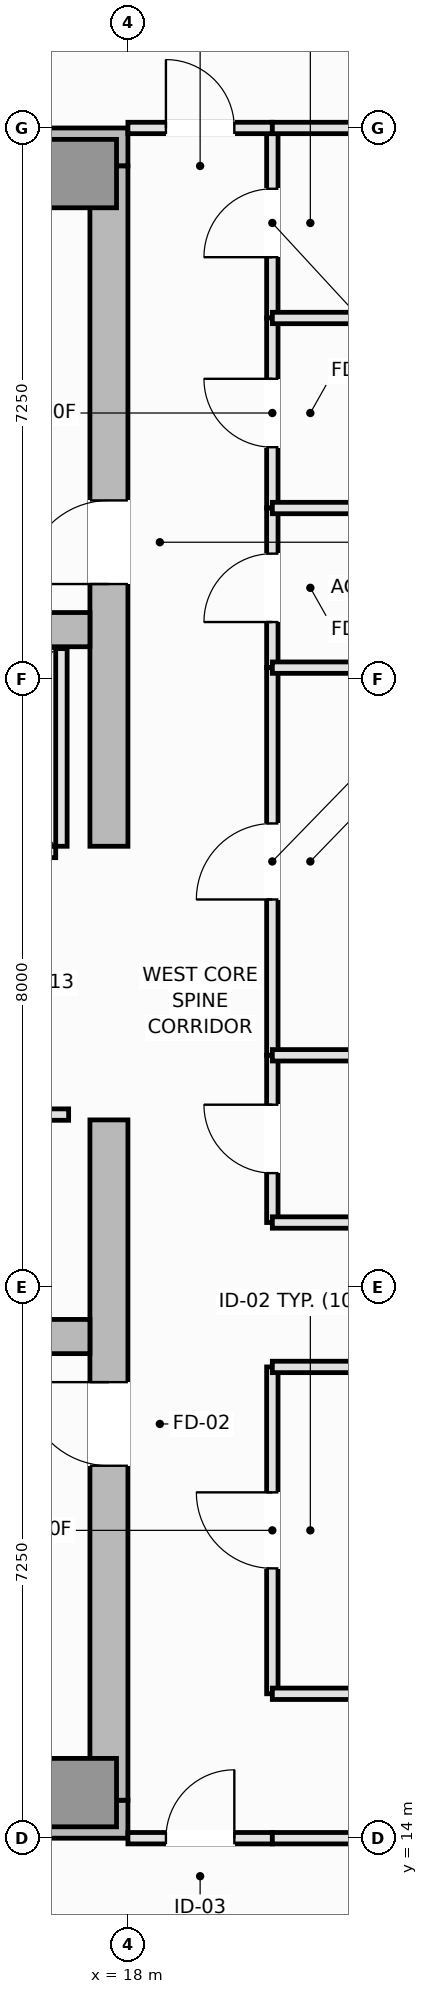
"""IFC4 building model, lengths in metres.
Left out: names, types, materials, properties, quantities, classifications, styles, units other than length and angle.
Written with IfcOpenShell. Run it as: python <this file> out.ifc"""

import sys

from ifc_helpers import new_model, si_unit, direction, frame, frame_2d, origin, origin_2d, place, context, subcontext, project, spatial, rectangle, extrude, element, fill, save


model = new_model("IFC4")
c1 = context("Model", 3, precision=1e-05, world=origin(), true_north=direction((0.0, 1.0)))
c2 = subcontext(c1, "Body", "Model", "MODEL_VIEW")
j1 = project(units=[si_unit("LENGTHUNIT", "METRE"), si_unit("PLANEANGLEUNIT", "RADIAN")], contexts=[c1])
p1 = place(None, origin())
s1 = spatial("IfcSite", under=j1, at=p1, CompositionType="ELEMENT")
p2 = place(p1, origin())
s2 = spatial("IfcBuilding", under=s1, at=p2, CompositionType="ELEMENT")
p3 = place(p2, frame((0.0, 0.0, 270.55)))
s3 = spatial("IfcBuildingStorey", under=s2, at=p3, CompositionType="ELEMENT", Elevation=270.55)
for number, where, z_axis, x_axis in (
    (1, (4.5, 14.25, 0.0), (0.0, 0.0, 1.0), (1.0, 0.0, 0.0)),
    (2, (4.5, 36.25, 0.0), (0.0, 0.0, 1.0), (1.0, 0.0, 0.0)),
):
    element("IfcWall", number, at=place(p3, frame(where, z_axis=z_axis, x_axis=x_axis)), inside=s3, PredefinedType="SHEAR", context=c2, shape_type="SweptSolid", body=[
        extrude(rectangle(XDim=13.5, YDim=0.5, at=frame_2d((6.75, 0.0))), origin(), (0.0, 0.0, 1.0), 3.55),
    ])
p4 = place(p3, frame((17.75, 14.5, 0.0), z_axis=(0.0, 0.0, 1.0), x_axis=(0.0, 1.0, 0.0)))
e3 = element("IfcWall", 3, at=p4, inside=s3, PredefinedType="SHEAR", context=c2, shape_type="SweptSolid", body=[
    extrude(rectangle(XDim=8.95, YDim=0.5, at=frame_2d((4.475, 0.0))), origin(), (0.0, 0.0, 1.0), 3.55),
])
p5 = place(p4, frame((4.4, 0.0, 0.0)))
e4 = element("IfcOpeningElement", 4, at=p5, cuts=e3, PredefinedType="OPENING", context=c2, shape_type="SweptSolid", body=[
    extrude(rectangle(XDim=1.1, YDim=2.15, at=frame_2d((0.55, 1.075))), frame((0.0, 0.26, 0.0), z_axis=(0.0, -1.0, 0.0), x_axis=(1.0, 0.0, 0.0)), (0.0, 0.0, 1.0), 0.52),
])
p6 = place(p3, frame((17.75, 27.05, 0.0), z_axis=(0.0, 0.0, 1.0), x_axis=(0.0, 1.0, 0.0)))
e5 = element("IfcWall", 5, at=p6, inside=s3, PredefinedType="SHEAR", context=c2, shape_type="SweptSolid", body=[
    extrude(rectangle(XDim=8.95, YDim=0.5, at=frame_2d((4.475, 0.0))), origin(), (0.0, 0.0, 1.0), 3.55),
])
p7 = place(p6, frame((3.45, 0.0, 0.0)))
e6 = element("IfcOpeningElement", 6, at=p7, cuts=e5, PredefinedType="OPENING", context=c2, shape_type="SweptSolid", body=[
    extrude(rectangle(XDim=1.1, YDim=2.15, at=frame_2d((0.55, 1.075))), frame((0.0, 0.26, 0.0), z_axis=(0.0, -1.0, 0.0), x_axis=(1.0, 0.0, 0.0)), (0.0, 0.0, 1.0), 0.52),
])
for number, where, z_axis, x_axis in (
    (7, (5.0, 20.6, 0.0), (0.0, 0.0, 1.0), (1.0, 0.0, 0.0)),
    (8, (5.0, 29.9, 0.0), (0.0, 0.0, 1.0), (1.0, 0.0, 0.0)),
):
    element("IfcWall", number, at=place(p3, frame(where, z_axis=z_axis, x_axis=x_axis)), inside=s3, PredefinedType="SHEAR", context=c2, shape_type="SweptSolid", body=[
        extrude(rectangle(XDim=12.5, YDim=0.45, at=frame_2d((6.25, 0.0))), origin(), (0.0, 0.0, 1.0), 3.55),
    ])
for number, where, z_axis, x_axis in (
    (9, (17.4, 14.6, 0.0), (0.0, 0.0, 1.0), (1.0, 0.0, 0.0)),
    (10, (17.4, 35.9, 0.0), (0.0, 0.0, 1.0), (1.0, 0.0, 0.0)),
):
    element("IfcColumn", number, at=place(p3, frame(where, z_axis=z_axis, x_axis=x_axis)), inside=s3, PredefinedType="PILASTER", context=c2, shape_type="SweptSolid", body=[
        extrude(rectangle(XDim=0.9, YDim=0.9, at=origin_2d()), origin(), (0.0, 0.0, 1.0), 3.55),
    ])
p8 = place(p3, frame((14.5, 26.975, 0.0), z_axis=(0.0, 0.0, 1.0), x_axis=(1.0, 0.0, 0.0)))
e11 = element("IfcWall", 11, at=p8, inside=s3, PredefinedType="PARTITIONING", context=c2, shape_type="SweptSolid", body=[
    extrude(rectangle(XDim=2.55, YDim=0.15, at=frame_2d((1.275, 0.0))), origin(), (0.0, 0.0, 1.0), 3.39),
])
p9 = place(p8, frame((0.625, 0.0, 0.0)))
e12 = element("IfcOpeningElement", 12, at=p9, cuts=e11, PredefinedType="OPENING", context=c2, shape_type="SweptSolid", body=[
    extrude(rectangle(XDim=1.3, YDim=2.2, at=frame_2d((0.65, 1.1))), frame((0.0, 0.085, 0.0), z_axis=(0.0, -1.0, 0.0), x_axis=(1.0, 0.0, 0.0)), (0.0, 0.0, 1.0), 0.17),
])
p10 = place(p3, frame((17.125, 27.05, 0.0), z_axis=(0.0, 0.0, 1.0), x_axis=(0.0, 1.0, 0.0)))
e13 = element("IfcWall", 13, at=p10, inside=s3, PredefinedType="PARTITIONING", context=c2, shape_type="SweptSolid", body=[
    extrude(rectangle(XDim=2.6, YDim=0.15, at=frame_2d((1.3, 0.0))), origin(), (0.0, 0.0, 1.0), 3.39),
])
p11 = place(p3, frame((14.33, 23.52, 0.0), z_axis=(0.0, 0.0, 1.0), x_axis=(1.0, 0.0, 0.0)))
e14 = element("IfcWall", 14, at=p11, inside=s3, PredefinedType="PARTITIONING", context=c2, shape_type="SweptSolid", body=[
    extrude(rectangle(XDim=2.89, YDim=0.15, at=frame_2d((1.445, 0.0))), origin(), (0.0, 0.0, 1.0), 3.39),
])
p12 = place(p11, frame((0.28, 0.0, 0.0)))
e15 = element("IfcOpeningElement", 15, at=p12, cuts=e14, PredefinedType="OPENING", context=c2, shape_type="SweptSolid", body=[
    extrude(rectangle(XDim=0.9, YDim=2.1, at=frame_2d((0.45, 1.05))), frame((0.0, 0.085, 0.0), z_axis=(0.0, -1.0, 0.0), x_axis=(1.0, 0.0, 0.0)), (0.0, 0.0, 1.0), 0.17),
])
p13 = place(p11, frame((1.71, 0.0, 0.0)))
e16 = element("IfcOpeningElement", 16, at=p13, cuts=e14, PredefinedType="OPENING", context=c2, shape_type="SweptSolid", body=[
    extrude(rectangle(XDim=0.9, YDim=2.1, at=frame_2d((0.45, 1.05))), frame((0.0, 0.085, 0.0), z_axis=(0.0, -1.0, 0.0), x_axis=(1.0, 0.0, 0.0)), (0.0, 0.0, 1.0), 0.17),
])
p14 = place(p3, frame((19.9, 15.9, 0.0), z_axis=(0.0, 0.0, 1.0), x_axis=(0.0, 1.0, 0.0)))
e17 = element("IfcWall", 17, at=p14, inside=s3, PredefinedType="PARTITIONING", context=c2, shape_type="SweptSolid", body=[
    extrude(rectangle(XDim=4.3, YDim=0.15, at=frame_2d((2.15, 0.0))), origin(), (0.0, 0.0, 1.0), 3.39),
])
p15 = place(p14, frame((1.65, 0.0, 0.0)))
e18 = element("IfcOpeningElement", 18, at=p15, cuts=e17, PredefinedType="OPENING", context=c2, shape_type="SweptSolid", body=[
    extrude(rectangle(XDim=1.0, YDim=2.15, at=frame_2d((0.5, 1.075))), frame((0.0, 0.085, 0.0), z_axis=(0.0, -1.0, 0.0), x_axis=(1.0, 0.0, 0.0)), (0.0, 0.0, 1.0), 0.17),
])
p16 = place(p3, frame((19.9, 34.0, 0.0), z_axis=(0.0, 0.0, 1.0), x_axis=(0.0, 1.0, 0.0)))
e19 = element("IfcWall", 19, at=p16, inside=s3, PredefinedType="PLUMBINGWALL", context=c2, shape_type="SweptSolid", body=[
    extrude(rectangle(XDim=2.5, YDim=0.15, at=frame_2d((1.25, 0.0))), origin(), (0.0, 0.0, 1.0), 3.39),
])
p17 = place(p16, frame((0.8, 0.0, 0.0)))
e20 = element("IfcOpeningElement", 20, at=p17, cuts=e19, PredefinedType="OPENING", context=c2, shape_type="SweptSolid", body=[
    extrude(rectangle(XDim=0.9, YDim=2.1, at=frame_2d((0.45, 1.05))), frame((0.0, 0.085, 0.0), z_axis=(0.0, -1.0, 0.0), x_axis=(1.0, 0.0, 0.0)), (0.0, 0.0, 1.0), 0.17),
])
p18 = place(p3, frame((19.9, 31.5, 0.0), z_axis=(0.0, 0.0, 1.0), x_axis=(0.0, 1.0, 0.0)))
e21 = element("IfcWall", 21, at=p18, inside=s3, PredefinedType="PLUMBINGWALL", context=c2, shape_type="SweptSolid", body=[
    extrude(rectangle(XDim=2.5, YDim=0.15, at=frame_2d((1.25, 0.0))), origin(), (0.0, 0.0, 1.0), 3.39),
])
p19 = place(p18, frame((0.8, 0.0, 0.0)))
e22 = element("IfcOpeningElement", 22, at=p19, cuts=e21, PredefinedType="OPENING", context=c2, shape_type="SweptSolid", body=[
    extrude(rectangle(XDim=0.9, YDim=2.1, at=frame_2d((0.45, 1.05))), frame((0.0, 0.085, 0.0), z_axis=(0.0, -1.0, 0.0), x_axis=(1.0, 0.0, 0.0)), (0.0, 0.0, 1.0), 0.17),
])
p20 = place(p3, frame((19.9, 29.4, 0.0), z_axis=(0.0, 0.0, 1.0), x_axis=(0.0, 1.0, 0.0)))
e23 = element("IfcWall", 23, at=p20, inside=s3, PredefinedType="PLUMBINGWALL", context=c2, shape_type="SweptSolid", body=[
    extrude(rectangle(XDim=2.1, YDim=0.15, at=frame_2d((1.05, 0.0))), origin(), (0.0, 0.0, 1.0), 3.39),
])
p21 = place(p20, frame((0.6, 0.0, 0.0)))
e24 = element("IfcOpeningElement", 24, at=p21, cuts=e23, PredefinedType="OPENING", context=c2, shape_type="SweptSolid", body=[
    extrude(rectangle(XDim=0.9, YDim=2.1, at=frame_2d((0.45, 1.05))), frame((0.0, 0.085, 0.0), z_axis=(0.0, -1.0, 0.0), x_axis=(1.0, 0.0, 0.0)), (0.0, 0.0, 1.0), 0.17),
])
p22 = place(p3, frame((19.9, 22.1, 0.0), z_axis=(0.0, 0.0, 1.0), x_axis=(0.0, 1.0, 0.0)))
e25 = element("IfcWall", 25, at=p22, inside=s3, PredefinedType="PLUMBINGWALL", context=c2, shape_type="SweptSolid", body=[
    extrude(rectangle(XDim=2.2, YDim=0.15, at=frame_2d((1.1, 0.0))), origin(), (0.0, 0.0, 1.0), 3.39),
])
p23 = place(p22, frame((0.65, 0.0, 0.0)))
e26 = element("IfcOpeningElement", 26, at=p23, cuts=e25, PredefinedType="OPENING", context=c2, shape_type="SweptSolid", body=[
    extrude(rectangle(XDim=0.9, YDim=2.1, at=frame_2d((0.45, 1.05))), frame((0.0, 0.085, 0.0), z_axis=(0.0, -1.0, 0.0), x_axis=(1.0, 0.0, 0.0)), (0.0, 0.0, 1.0), 0.17),
])
p24 = place(p3, frame((19.9, 24.3, 0.0), z_axis=(0.0, 0.0, 1.0), x_axis=(0.0, 1.0, 0.0)))
e27 = element("IfcWall", 27, at=p24, inside=s3, PredefinedType="PARTITIONING", context=c2, shape_type="SweptSolid", body=[
    extrude(rectangle(XDim=5.1, YDim=0.15, at=frame_2d((2.55, 0.0))), origin(), (0.0, 0.0, 1.0), 3.39),
])
p25 = place(p24, frame((2.05, 0.0, 0.0)))
e28 = element("IfcOpeningElement", 28, at=p25, cuts=e27, PredefinedType="OPENING", context=c2, shape_type="SweptSolid", body=[
    extrude(rectangle(XDim=1.0, YDim=2.15, at=frame_2d((0.5, 1.075))), frame((0.0, 0.085, 0.0), z_axis=(0.0, -1.0, 0.0), x_axis=(1.0, 0.0, 0.0)), (0.0, 0.0, 1.0), 0.17),
])
p26 = place(p3, frame((18.0, 14.0, 0.0), z_axis=(0.0, 0.0, 1.0), x_axis=(1.0, 0.0, 0.0)))
e29 = element("IfcWall", 29, at=p26, inside=s3, PredefinedType="PARTITIONING", context=c2, shape_type="SweptSolid", body=[
    extrude(rectangle(XDim=1.9, YDim=0.15, at=frame_2d((0.95, 0.0))), origin(), (0.0, 0.0, 1.0), 3.39),
])
p27 = place(p26, frame((0.5, 0.0, 0.0)))
e30 = element("IfcOpeningElement", 30, at=p27, cuts=e29, PredefinedType="OPENING", context=c2, shape_type="SweptSolid", body=[
    extrude(rectangle(XDim=0.9, YDim=2.1, at=frame_2d((0.45, 1.05))), frame((0.0, 0.085, 0.0), z_axis=(0.0, -1.0, 0.0), x_axis=(1.0, 0.0, 0.0)), (0.0, 0.0, 1.0), 0.17),
])
p28 = place(p3, frame((18.0, 36.5, 0.0), z_axis=(0.0, 0.0, 1.0), x_axis=(1.0, 0.0, 0.0)))
e31 = element("IfcWall", 31, at=p28, inside=s3, PredefinedType="PARTITIONING", context=c2, shape_type="SweptSolid", body=[
    extrude(rectangle(XDim=1.9, YDim=0.15, at=frame_2d((0.95, 0.0))), origin(), (0.0, 0.0, 1.0), 3.39),
])
p29 = place(p28, frame((0.5, 0.0, 0.0)))
e32 = element("IfcOpeningElement", 32, at=p29, cuts=e31, PredefinedType="OPENING", context=c2, shape_type="SweptSolid", body=[
    extrude(rectangle(XDim=0.9, YDim=2.1, at=frame_2d((0.45, 1.05))), frame((0.0, 0.085, 0.0), z_axis=(0.0, -1.0, 0.0), x_axis=(1.0, 0.0, 0.0)), (0.0, 0.0, 1.0), 0.17),
])
p30 = place(p3, frame((19.9, 20.2, 0.0), z_axis=(0.0, 0.0, 1.0), x_axis=(1.0, 0.0, 0.0)))
e33 = element("IfcWall", 33, at=p30, inside=s3, PredefinedType="PARTITIONING", context=c2, shape_type="SweptSolid", body=[
    extrude(rectangle(XDim=6.23, YDim=0.15, at=frame_2d((3.115, 0.0))), origin(), (0.0, 0.0, 1.0), 3.39),
])
p31 = place(p3, frame((19.9, 22.1, 0.0), z_axis=(0.0, 0.0, 1.0), x_axis=(1.0, 0.0, 0.0)))
e34 = element("IfcWall", 34, at=p31, inside=s3, PredefinedType="PLUMBINGWALL", context=c2, shape_type="SweptSolid", body=[
    extrude(rectangle(XDim=3.6, YDim=0.15, at=frame_2d((1.8, 0.0))), origin(), (0.0, 0.0, 1.0), 3.39),
])
p32 = place(p3, frame((19.9, 15.9, 0.0), z_axis=(0.0, 0.0, 1.0), x_axis=(1.0, 0.0, 0.0)))
e35 = element("IfcWall", 35, at=p32, inside=s3, PredefinedType="PARTITIONING", context=c2, shape_type="SweptSolid", body=[
    extrude(rectangle(XDim=6.23, YDim=0.15, at=frame_2d((3.115, 0.0))), origin(), (0.0, 0.0, 1.0), 3.39),
])
p33 = place(p3, frame((19.9, 14.0, 0.0), z_axis=(0.0, 0.0, 1.0), x_axis=(1.0, 0.0, 0.0)))
e36 = element("IfcWall", 36, at=p33, inside=s3, PredefinedType="PARTITIONING", context=c2, shape_type="SweptSolid", body=[
    extrude(rectangle(XDim=7.6, YDim=0.15, at=frame_2d((3.8, 0.0))), origin(), (0.0, 0.0, 1.0), 3.39),
])
for number, where, z_axis, x_axis in (
    (37, (19.9, 34.0, 0.0), (0.0, 0.0, 1.0), (1.0, 0.0, 0.0)),
    (38, (19.9, 36.5, 0.0), (0.0, 0.0, 1.0), (1.0, 0.0, 0.0)),
    (39, (19.9, 31.5, 0.0), (0.0, 0.0, 1.0), (1.0, 0.0, 0.0)),
    (40, (19.9, 29.4, 0.0), (0.0, 0.0, 1.0), (1.0, 0.0, 0.0)),
    (41, (19.9, 24.3, 0.0), (0.0, 0.0, 1.0), (1.0, 0.0, 0.0)),
):
    element("IfcWall", number, at=place(p3, frame(where, z_axis=z_axis, x_axis=x_axis)), inside=s3, PredefinedType="PLUMBINGWALL", context=c2, shape_type="SweptSolid", body=[
        extrude(rectangle(XDim=3.6, YDim=0.15, at=frame_2d((1.8, 0.0))), origin(), (0.0, 0.0, 1.0), 3.39),
    ])
p34 = place(p5, origin())
e42 = element("IfcDoor", 42, at=p34, inside=s3, OperationType="SINGLE_SWING_RIGHT", PredefinedType="DOOR", context=c2, shape_type="SweptSolid", body=[
    extrude(rectangle(XDim=1.1, YDim=2.15, at=frame_2d((0.55, 1.075))), frame((0.0, 0.025, 0.0), z_axis=(0.0, -1.0, 0.0), x_axis=(1.0, 0.0, 0.0)), (0.0, 0.0, 1.0), 0.05),
])
fill(e4, e42)
p35 = place(p7, origin())
e43 = element("IfcDoor", 43, at=p35, inside=s3, OperationType="SINGLE_SWING_LEFT", PredefinedType="DOOR", context=c2, shape_type="SweptSolid", body=[
    extrude(rectangle(XDim=1.1, YDim=2.15, at=frame_2d((0.55, 1.075))), frame((0.0, 0.025, 0.0), z_axis=(0.0, -1.0, 0.0), x_axis=(1.0, 0.0, 0.0)), (0.0, 0.0, 1.0), 0.05),
])
fill(e6, e43)
p36 = place(p15, origin())
e44 = element("IfcDoor", 44, at=p36, inside=s3, OperationType="SINGLE_SWING_RIGHT", PredefinedType="DOOR", context=c2, shape_type="SweptSolid", body=[
    extrude(rectangle(XDim=1.0, YDim=2.15, at=frame_2d((0.5, 1.075))), frame((0.0, 0.025, 0.0), z_axis=(0.0, -1.0, 0.0), x_axis=(1.0, 0.0, 0.0)), (0.0, 0.0, 1.0), 0.05),
])
fill(e18, e44)
p37 = place(p17, origin())
e45 = element("IfcDoor", 45, at=p37, inside=s3, OperationType="SINGLE_SWING_LEFT", PredefinedType="DOOR", context=c2, shape_type="SweptSolid", body=[
    extrude(rectangle(XDim=0.9, YDim=2.1, at=frame_2d((0.45, 1.05))), frame((0.0, 0.025, 0.0), z_axis=(0.0, -1.0, 0.0), x_axis=(1.0, 0.0, 0.0)), (0.0, 0.0, 1.0), 0.05),
])
fill(e20, e45)
p38 = place(p19, origin())
e46 = element("IfcDoor", 46, at=p38, inside=s3, OperationType="SINGLE_SWING_RIGHT", PredefinedType="DOOR", context=c2, shape_type="SweptSolid", body=[
    extrude(rectangle(XDim=0.9, YDim=2.1, at=frame_2d((0.45, 1.05))), frame((0.0, 0.025, 0.0), z_axis=(0.0, -1.0, 0.0), x_axis=(1.0, 0.0, 0.0)), (0.0, 0.0, 1.0), 0.05),
])
fill(e22, e46)
p39 = place(p21, origin())
e47 = element("IfcDoor", 47, at=p39, inside=s3, OperationType="SINGLE_SWING_LEFT", PredefinedType="DOOR", context=c2, shape_type="SweptSolid", body=[
    extrude(rectangle(XDim=0.9, YDim=2.1, at=frame_2d((0.45, 1.05))), frame((0.0, 0.025, 0.0), z_axis=(0.0, -1.0, 0.0), x_axis=(1.0, 0.0, 0.0)), (0.0, 0.0, 1.0), 0.05),
])
fill(e24, e47)
p40 = place(p23, origin())
e48 = element("IfcDoor", 48, at=p40, inside=s3, OperationType="SINGLE_SWING_RIGHT", PredefinedType="DOOR", context=c2, shape_type="SweptSolid", body=[
    extrude(rectangle(XDim=0.9, YDim=2.1, at=frame_2d((0.45, 1.05))), frame((0.0, 0.025, 0.0), z_axis=(0.0, -1.0, 0.0), x_axis=(1.0, 0.0, 0.0)), (0.0, 0.0, 1.0), 0.05),
])
fill(e26, e48)
p41 = place(p25, origin())
e49 = element("IfcDoor", 49, at=p41, inside=s3, OperationType="SINGLE_SWING_LEFT", PredefinedType="DOOR", context=c2, shape_type="SweptSolid", body=[
    extrude(rectangle(XDim=1.0, YDim=2.15, at=frame_2d((0.5, 1.075))), frame((0.0, 0.025, 0.0), z_axis=(0.0, -1.0, 0.0), x_axis=(1.0, 0.0, 0.0)), (0.0, 0.0, 1.0), 0.05),
])
fill(e28, e49)
p42 = place(p27, origin())
e50 = element("IfcDoor", 50, at=p42, inside=s3, OperationType="SINGLE_SWING_RIGHT", PredefinedType="DOOR", context=c2, shape_type="SweptSolid", body=[
    extrude(rectangle(XDim=0.9, YDim=2.1, at=frame_2d((0.45, 1.05))), frame((0.0, 0.025, 0.0), z_axis=(0.0, -1.0, 0.0), x_axis=(1.0, 0.0, 0.0)), (0.0, 0.0, 1.0), 0.05),
])
fill(e30, e50)
p43 = place(p29, origin())
e51 = element("IfcDoor", 51, at=p43, inside=s3, OperationType="SINGLE_SWING_LEFT", PredefinedType="DOOR", context=c2, shape_type="SweptSolid", body=[
    extrude(rectangle(XDim=0.9, YDim=2.1, at=frame_2d((0.45, 1.05))), frame((0.0, 0.025, 0.0), z_axis=(0.0, -1.0, 0.0), x_axis=(1.0, 0.0, 0.0)), (0.0, 0.0, 1.0), 0.05),
])
fill(e32, e51)
save(model, sys.argv[1])
